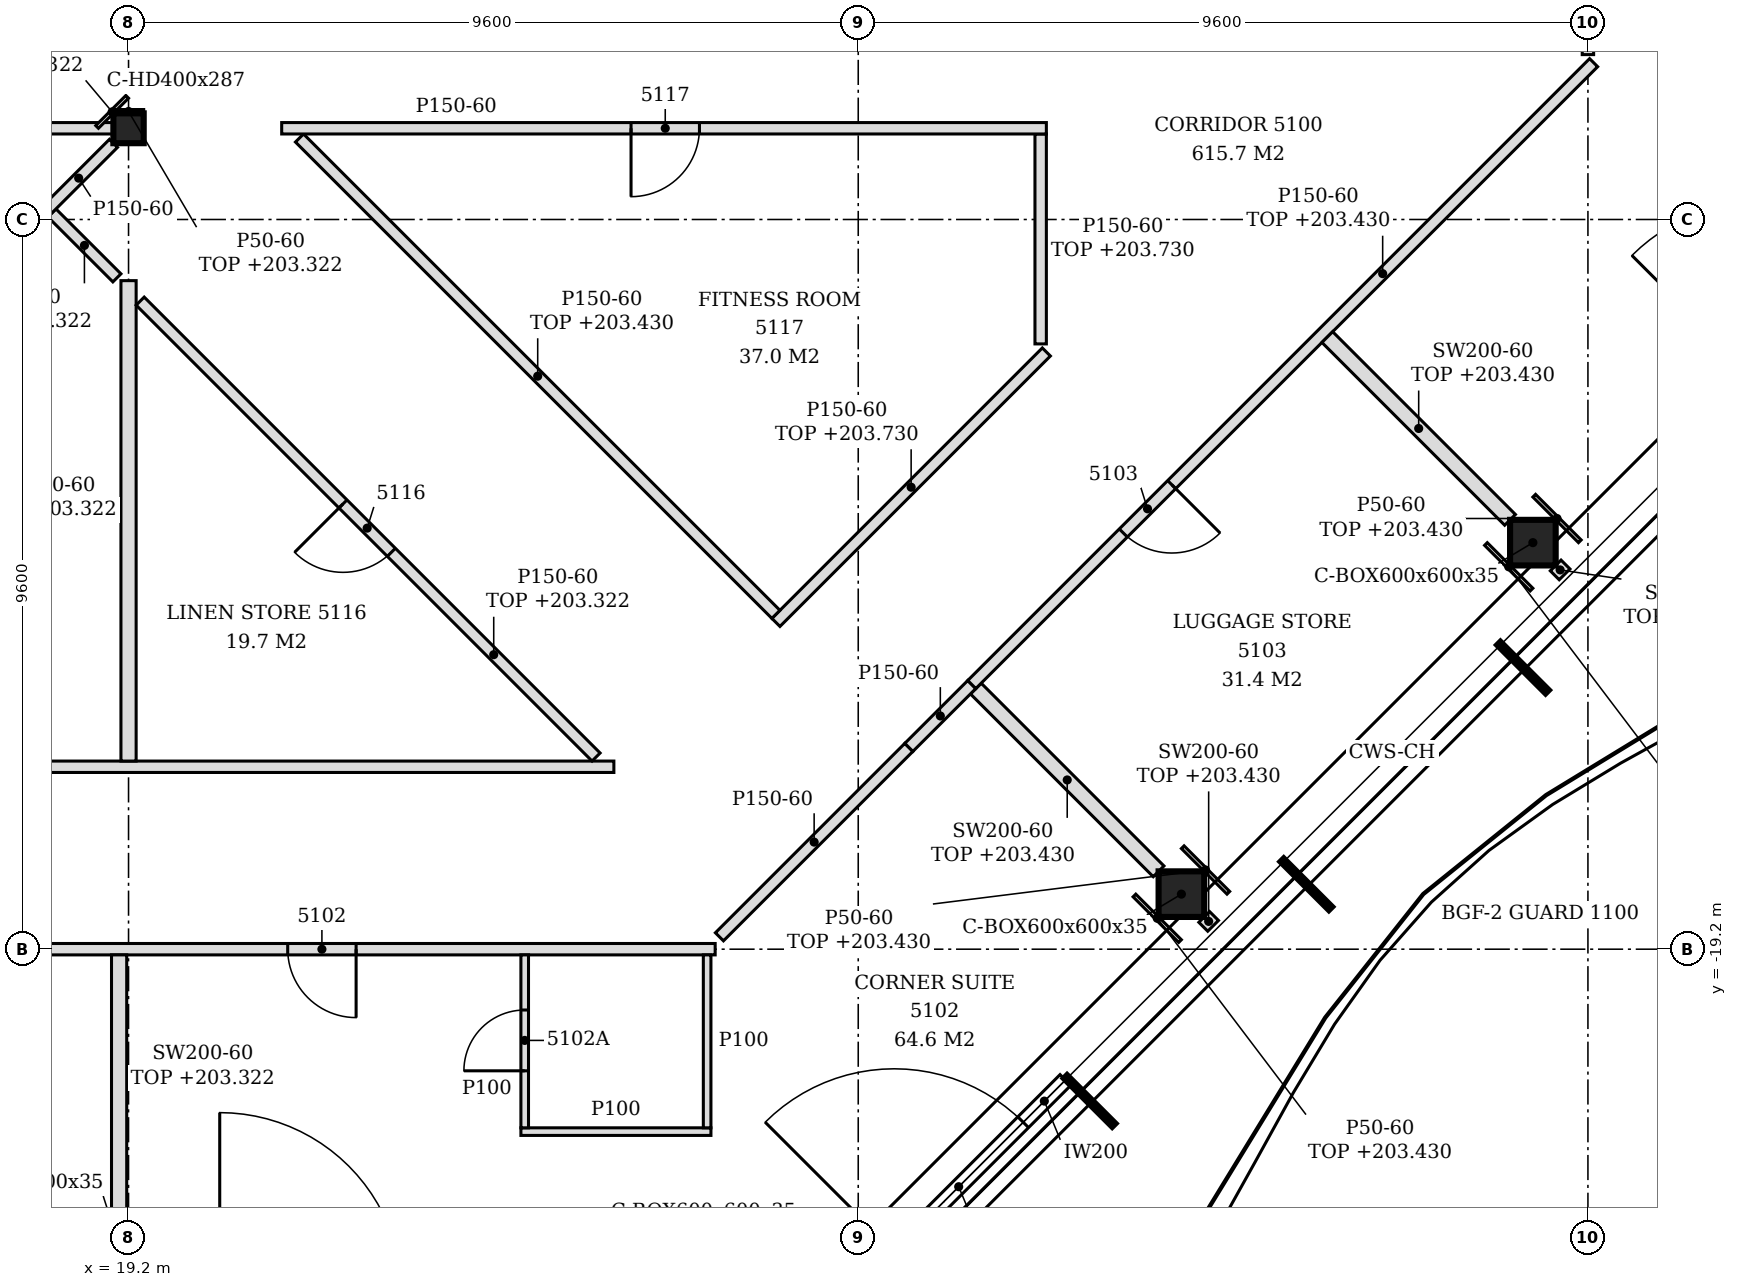
"""IFC4 building model, lengths in metres.
Left out: names, types, materials, properties, quantities, classifications, styles, units other than length and angle.
Written with IfcOpenShell. Run it as: python <this file> out.ifc"""

import sys

from ifc_helpers import new_model, si_unit, direction, frame, frame_2d, origin, origin_2d, place, context, subcontext, project, spatial, polyline, rectangle, hollow_rectangle, i_section, outline, extrude, clip, halfspace, element, fill, save


model = new_model("IFC4")
c1 = context("Model", 3, precision=1e-05, world=origin(), true_north=direction((0.0, 1.0)))
c2 = subcontext(c1, "Body", "Model", "MODEL_VIEW")
j1 = project(units=[si_unit("LENGTHUNIT", "METRE"), si_unit("PLANEANGLEUNIT", "RADIAN")], contexts=[c1])
p1 = place(None, origin())
s1 = spatial("IfcSite", under=j1, at=p1, CompositionType="ELEMENT")
p2 = place(p1, origin())
s2 = spatial("IfcBuilding", under=s1, at=p2, CompositionType="ELEMENT")
p3 = place(p2, frame((0.0, 0.0, 201.0)))
s3 = spatial("IfcBuildingStorey", under=s2, at=p3, CompositionType="ELEMENT", Elevation=201.0)
for number, where, z_axis, x_axis in (
    (1, (33.052, -18.476, -0.15), (0.0, 0.0, 1.0), (1.0, 0.0, 0.0)),
    (2, (37.676, -13.852, -0.15), (0.0, 0.0, 1.0), (1.0, 0.0, 0.0)),
):
    element("IfcColumn", number, at=place(p3, frame(where, z_axis=z_axis, x_axis=x_axis)), inside=s3, PredefinedType="COLUMN", context=c2, shape_type="Clipping", body=[
        clip(clip(extrude(hollow_rectangle(XDim=0.6, YDim=0.6, WallThickness=0.035, at=origin_2d()), origin(), (0.0, 0.0, 1.0), 3.5), halfspace(frame((0.0, 0.0, 0.011), z_axis=(0.0, 0.0, 1.0), x_axis=(1.0, 0.0, 0.0)), True)), halfspace(frame((0.0, 0.0, 3.095), z_axis=(0.0, 0.0, 1.0), x_axis=(1.0, 0.0, 0.0)), False)),
    ])
p4 = place(p3, frame((19.2, -8.4, -0.15), z_axis=(0.0, 0.0, 1.0), x_axis=(1.0, 0.0, 0.0)))
e3 = element("IfcColumn", 3, at=p4, inside=s3, PredefinedType="COLUMN", context=c2, shape_type="SweptSolid", body=[
    extrude(i_section(OverallWidth=0.399, OverallDepth=0.393, WebThickness=0.023, FlangeThickness=0.037, FilletRadius=0.015, at=origin_2d()), origin(), (0.0, 0.0, 1.0), 3.5),
])
p5 = place(p3, frame((28.725, -23.722, 0.0), z_axis=(0.0, 0.0, 1.0), x_axis=(0.707106781187, 0.707106781187, 0.0)))
e4 = element("IfcWall", 4, at=p5, inside=s3, PredefinedType="NOTDEFINED", context=c2, shape_type="SweptSolid", body=[
    extrude(rectangle(XDim=3.962, YDim=0.2, at=frame_2d((1.981, 0.0))), origin(), (0.0, 0.0, 1.0), 3.35),
])
p6 = place(p5, frame((0.775, 0.0, 0.0)))
e5 = element("IfcOpeningElement", 5, at=p6, cuts=e4, PredefinedType="OPENING", context=c2, shape_type="SweptSolid", body=[
    extrude(rectangle(XDim=2.4, YDim=2.4, at=frame_2d((1.2, 1.2))), frame((0.0, 0.11, 0.0), z_axis=(0.0, -1.0, 0.0), x_axis=(1.0, 0.0, 0.0)), (0.0, 0.0, 1.0), 0.22),
])
p7 = place(p3, frame((19.076, -22.8, 0.0), z_axis=(0.0, 0.0, 1.0), x_axis=(0.0, 1.0, 0.0)))
e6 = element("IfcWall", 6, at=p7, inside=s3, PredefinedType="PARTITIONING", context=c2, shape_type="SweptSolid", body=[
    extrude(rectangle(XDim=3.525, YDim=0.2, at=frame_2d((1.763, 0.0))), origin(), (0.0, 0.0, 1.0), 2.322),
])
p8 = place(p3, frame((24.362, -21.6, 0.0), z_axis=(0.0, 0.0, 1.0), x_axis=(1.0, 0.0, 0.0)))
e7 = element("IfcWall", 7, at=p8, inside=s3, PredefinedType="PARTITIONING", context=c2, shape_type="SweptSolid", body=[
    extrude(rectangle(XDim=2.5, YDim=0.1, at=frame_2d((1.25, 0.0))), origin(), (0.0, 0.0, 1.0), 3.35),
])
p9 = place(p3, frame((24.412, -21.55, 0.0), z_axis=(0.0, 0.0, 1.0), x_axis=(0.0, 1.0, 0.0)))
e8 = element("IfcWall", 8, at=p9, inside=s3, PredefinedType="PARTITIONING", context=c2, shape_type="SweptSolid", body=[
    extrude(outline(polyline([(0.0, 0.0), (2.275, 0.0), (2.275, 2.78), (2.245, 2.78), (2.243, 3.35), (0.0, 3.35), (0.0, 0.0)])), frame((0.0, 0.05, 0.0), z_axis=(0.0, -1.0, 0.0), x_axis=(1.0, 0.0, 0.0)), (0.0, 0.0, 1.0), 0.1),
])
p10 = place(p9, frame((0.75, 0.0, 0.0)))
e9 = element("IfcOpeningElement", 9, at=p10, cuts=e8, PredefinedType="OPENING", context=c2, shape_type="SweptSolid", body=[
    extrude(rectangle(XDim=0.8, YDim=2.1, at=frame_2d((0.4, 1.05))), frame((0.0, 0.06, 0.0), z_axis=(0.0, -1.0, 0.0), x_axis=(1.0, 0.0, 0.0)), (0.0, 0.0, 1.0), 0.12),
])
p11 = place(p3, frame((26.812, -21.55, 0.0), z_axis=(0.0, 0.0, 1.0), x_axis=(0.0, 1.0, 0.0)))
e10 = element("IfcWall", 10, at=p11, inside=s3, PredefinedType="PARTITIONING", context=c2, shape_type="SweptSolid", body=[
    extrude(outline(polyline([(0.0, 0.0), (2.275, 0.0), (2.275, 2.78), (2.245, 2.78), (2.243, 3.35), (0.0, 3.35), (0.0, 0.0)])), frame((0.0, 0.05, 0.0), z_axis=(0.0, -1.0, 0.0), x_axis=(1.0, 0.0, 0.0)), (0.0, 0.0, 1.0), 0.1),
])
p12 = place(p3, frame((2.5, -19.2, 0.0), z_axis=(0.0, 0.0, 1.0), x_axis=(1.0, 0.0, 0.0)))
e11 = element("IfcWall", 11, at=p12, inside=s3, PredefinedType="PARTITIONING", context=c2, shape_type="SweptSolid", body=[
    extrude(outline(polyline([(0.0, 0.0), (24.418, 0.0), (24.418, 2.78), (16.851, 2.78), (16.849, 2.322), (16.549, 2.322), (16.547, 2.78), (4.85, 2.78), (4.848, 2.63), (4.55, 2.63), (4.548, 2.78), (0.0, 2.78), (0.0, 0.0)])), frame((0.0, 0.075, 0.0), z_axis=(0.0, -1.0, 0.0), x_axis=(1.0, 0.0, 0.0)), (0.0, 0.0, 1.0), 0.15),
])
p13 = place(p12, frame((11.45, 0.0, 0.0)))
e12 = element("IfcOpeningElement", 12, at=p13, cuts=e11, PredefinedType="OPENING", context=c2, shape_type="SweptSolid", body=[
    extrude(rectangle(XDim=0.9, YDim=2.1, at=frame_2d((0.45, 1.05))), frame((0.0, 0.085, 0.0), z_axis=(0.0, -1.0, 0.0), x_axis=(1.0, 0.0, 0.0)), (0.0, 0.0, 1.0), 0.17),
])
p14 = place(p12, frame((18.794, 0.0, 0.0)))
e13 = element("IfcOpeningElement", 13, at=p14, cuts=e11, PredefinedType="OPENING", context=c2, shape_type="SweptSolid", body=[
    extrude(rectangle(XDim=0.9, YDim=2.1, at=frame_2d((0.45, 1.05))), frame((0.0, 0.085, 0.0), z_axis=(0.0, -1.0, 0.0), x_axis=(1.0, 0.0, 0.0)), (0.0, 0.0, 1.0), 0.17),
])
p15 = place(p3, frame((26.974, -19.037, 0.0), z_axis=(0.0, 0.0, 1.0), x_axis=(0.707106781187, 0.707106781187, 0.0)))
e14 = element("IfcWall", 14, at=p15, inside=s3, PredefinedType="PARTITIONING", context=c2, shape_type="SweptSolid", body=[
    extrude(rectangle(XDim=3.524, YDim=0.15, at=frame_2d((1.762, 0.0))), origin(), (0.0, 0.0, 1.0), 3.35),
])
p16 = place(p3, frame((33.469, -18.893, 0.0), z_axis=(0.0, 0.0, 1.0), x_axis=(-0.707106781187, 0.707106781187, 0.0)))
e15 = element("IfcWall", 15, at=p16, inside=s3, PredefinedType="PARTITIONING", context=c2, shape_type="SweptSolid", body=[
    extrude(rectangle(XDim=0.166, YDim=0.2, at=frame_2d((0.083, 0.0))), origin(), (0.0, 0.0, 1.0), 2.43),
])
p17 = place(p3, frame((32.752, -18.176, 0.0), z_axis=(0.0, 0.0, 1.0), x_axis=(-0.707106781187, 0.707106781187, 0.0)))
e16 = element("IfcWall", 16, at=p17, inside=s3, PredefinedType="PARTITIONING", context=c2, shape_type="SweptSolid", body=[
    extrude(rectangle(XDim=3.401, YDim=0.2, at=frame_2d((1.7, 0.0))), origin(), (0.0, 0.0, 1.0), 2.43),
])
p18 = place(p3, frame((7.125, -16.8, 0.0), z_axis=(0.0, 0.0, 1.0), x_axis=(1.0, 0.0, 0.0)))
e17 = element("IfcWall", 17, at=p18, inside=s3, PredefinedType="PARTITIONING", context=c2, shape_type="SweptSolid", body=[
    extrude(outline(polyline([(0.0, 0.0), (18.46, 0.0), (18.46, 3.35), (12.226, 3.35), (12.224, 2.322), (11.924, 2.322), (11.922, 3.35), (0.225, 3.35), (0.223, 2.63), (0.0, 2.63), (0.0, 0.0)])), frame((0.0, 0.075, 0.0), z_axis=(0.0, -1.0, 0.0), x_axis=(1.0, 0.0, 0.0)), (0.0, 0.0, 1.0), 0.15),
])
p19 = place(p3, frame((19.2, -16.725, 0.0), z_axis=(0.0, 0.0, 1.0), x_axis=(0.0, 1.0, 0.0)))
e18 = element("IfcWall", 18, at=p19, inside=s3, PredefinedType="PARTITIONING", context=c2, shape_type="SweptSolid", body=[
    extrude(rectangle(XDim=6.321, YDim=0.2, at=frame_2d((3.16, 0.0))), origin(), (0.0, 0.0, 1.0), 2.322),
])
p20 = place(p3, frame((25.351, -16.672, 0.0), z_axis=(0.0, 0.0, 1.0), x_axis=(-0.707106781187, 0.707106781187, 0.0)))
e19 = element("IfcWall", 19, at=p20, inside=s3, PredefinedType="PARTITIONING", context=c2, shape_type="SweptSolid", body=[
    extrude(rectangle(XDim=8.482, YDim=0.15, at=frame_2d((4.241, 0.0))), origin(), (0.0, 0.0, 1.0), 2.322),
])
p21 = place(p20, frame((3.809, 0.0, 0.0)))
e20 = element("IfcOpeningElement", 20, at=p21, cuts=e19, PredefinedType="OPENING", context=c2, shape_type="SweptSolid", body=[
    extrude(rectangle(XDim=0.9, YDim=2.1, at=frame_2d((0.45, 1.05))), frame((0.0, 0.085, 0.0), z_axis=(0.0, -1.0, 0.0), x_axis=(1.0, 0.0, 0.0)), (0.0, 0.0, 1.0), 0.17),
])
p22 = place(p3, frame((29.466, -16.545, 0.0), z_axis=(0.0, 0.0, 1.0), x_axis=(0.70752395322, 0.706689362889, 0.0)))
e21 = element("IfcWall", 21, at=p22, inside=s3, PredefinedType="PARTITIONING", context=c2, shape_type="SweptSolid", body=[
    extrude(rectangle(XDim=1.17, YDim=0.15, at=frame_2d((0.585, 0.0))), origin(), (0.0, 0.0, 1.0), 3.35),
])
p23 = place(p3, frame((30.294, -15.718, 0.0), z_axis=(0.0, 0.0, 1.0), x_axis=(0.707117331948, 0.707096230267, 0.0)))
e22 = element("IfcWall", 22, at=p23, inside=s3, PredefinedType="PARTITIONING", context=c2, shape_type="SweptSolid", body=[
    extrude(rectangle(XDim=11.57, YDim=0.15, at=frame_2d((5.785, 0.0))), origin(), (0.0, 0.0, 1.0), 2.43),
])
p24 = place(p23, frame((2.819, 0.0, 0.0)))
e23 = element("IfcOpeningElement", 23, at=p24, cuts=e22, PredefinedType="OPENING", context=c2, shape_type="SweptSolid", body=[
    extrude(rectangle(XDim=0.9, YDim=2.1, at=frame_2d((0.45, 1.05))), frame((0.0, 0.085, 0.0), z_axis=(0.0, -1.0, 0.0), x_axis=(1.0, 0.0, 0.0)), (0.0, 0.0, 1.0), 0.17),
])
p25 = place(p3, frame((27.717, -14.901, 0.0), z_axis=(0.0, 0.0, 1.0), x_axis=(0.707106781187, 0.707106781187, 0.0)))
e24 = element("IfcWall", 24, at=p25, inside=s3, PredefinedType="PARTITIONING", context=c2, shape_type="SweptSolid", body=[
    extrude(rectangle(XDim=5.031, YDim=0.15, at=frame_2d((2.516, 0.0))), origin(), (0.0, 0.0, 1.0), 2.73),
])
p26 = place(p3, frame((27.717, -14.795, 0.0), z_axis=(0.0, 0.0, 1.0), x_axis=(-0.707175638903, 0.707037916764, 0.0)))
e25 = element("IfcWall", 25, at=p26, inside=s3, PredefinedType="PARTITIONING", context=c2, shape_type="SweptSolid", body=[
    extrude(rectangle(XDim=8.864, YDim=0.15, at=frame_2d((4.432, 0.0))), origin(), (0.0, 0.0, 1.0), 2.43),
])
p27 = place(p3, frame((38.093, -14.269, 0.0), z_axis=(0.0, 0.0, 1.0), x_axis=(-0.707106781187, 0.707106781187, 0.0)))
e26 = element("IfcWall", 26, at=p27, inside=s3, PredefinedType="PARTITIONING", context=c2, shape_type="SweptSolid", body=[
    extrude(rectangle(XDim=0.166, YDim=0.2, at=frame_2d((0.083, 0.0))), origin(), (0.0, 0.0, 1.0), 2.43),
])
p28 = place(p3, frame((37.375, -13.552, 0.0), z_axis=(0.0, 0.0, 1.0), x_axis=(-0.707106781187, 0.707106781187, 0.0)))
e27 = element("IfcWall", 27, at=p28, inside=s3, PredefinedType="PARTITIONING", context=c2, shape_type="SweptSolid", body=[
    extrude(rectangle(XDim=3.4, YDim=0.2, at=frame_2d((1.7, 0.0))), origin(), (0.0, 0.0, 1.0), 2.43),
])
p29 = place(p3, frame((31.2, -11.237, 0.0), z_axis=(0.0, 0.0, 1.0), x_axis=(0.0, 1.0, 0.0)))
e28 = element("IfcWall", 28, at=p29, inside=s3, PredefinedType="PARTITIONING", context=c2, shape_type="SweptSolid", body=[
    extrude(outline(polyline([(0.0, 0.0), (2.762, 0.0), (2.762, 2.73), (2.09, 2.73), (2.088, 2.43), (1.187, 2.43), (1.185, 2.73), (0.0, 2.73), (0.0, 0.0)])), frame((0.0, 0.075, 0.0), z_axis=(0.0, -1.0, 0.0), x_axis=(1.0, 0.0, 0.0)), (0.0, 0.0, 1.0), 0.15),
])
p30 = place(p3, frame((19.047, -10.368, 0.0), z_axis=(0.0, 0.0, 1.0), x_axis=(-0.707409718716, 0.706803713817, 0.0)))
e29 = element("IfcWall", 29, at=p30, inside=s3, PredefinedType="PARTITIONING", context=c2, shape_type="SweptSolid", body=[
    extrude(rectangle(XDim=1.208, YDim=0.15, at=frame_2d((0.604, 0.0))), origin(), (0.0, 0.0, 1.0), 2.322),
])
p31 = place(p3, frame((18.086, -9.514, 0.0), z_axis=(0.0, 0.0, 1.0), x_axis=(0.707106781187, 0.707106781187, 0.0)))
e30 = element("IfcWall", 30, at=p31, inside=s3, PredefinedType="PARTITIONING", context=c2, shape_type="SweptSolid", body=[
    extrude(rectangle(XDim=1.295, YDim=0.15, at=frame_2d((0.648, 0.0))), origin(), (0.0, 0.0, 1.0), 3.35),
])
p32 = place(p3, frame((7.399, -8.4, 0.0), z_axis=(0.0, 0.0, 1.0), x_axis=(1.0, 0.0, 0.0)))
e31 = element("IfcWall", 31, at=p32, inside=s3, PredefinedType="PARTITIONING", context=c2, shape_type="SweptSolid", body=[
    extrude(rectangle(XDim=11.601, YDim=0.15, at=frame_2d((5.801, 0.0))), origin(), (0.0, 0.0, 1.0), 2.73),
])
p33 = place(p32, frame((5.351, 0.0, 0.0)))
e32 = element("IfcOpeningElement", 32, at=p33, cuts=e31, PredefinedType="OPENING", context=c2, shape_type="SweptSolid", body=[
    extrude(rectangle(XDim=0.9, YDim=2.1, at=frame_2d((0.45, 1.05))), frame((0.0, 0.085, 0.0), z_axis=(0.0, -1.0, 0.0), x_axis=(1.0, 0.0, 0.0)), (0.0, 0.0, 1.0), 0.17),
])
p34 = place(p3, frame((21.215, -8.4, 0.0), z_axis=(0.0, 0.0, 1.0), x_axis=(1.0, 0.0, 0.0)))
e33 = element("IfcWall", 33, at=p34, inside=s3, PredefinedType="PARTITIONING", context=c2, shape_type="SweptSolid", body=[
    extrude(outline(polyline([(0.0, 0.0), (10.06, 0.0), (10.06, 2.83), (9.835, 2.83), (9.833, 3.35), (0.0, 3.35), (0.0, 0.0)])), frame((0.0, 0.075, 0.0), z_axis=(0.0, -1.0, 0.0), x_axis=(1.0, 0.0, 0.0)), (0.0, 0.0, 1.0), 0.15),
])
p35 = place(p34, frame((4.596, 0.0, 0.0)))
e34 = element("IfcOpeningElement", 34, at=p35, cuts=e33, PredefinedType="OPENING", context=c2, shape_type="SweptSolid", body=[
    extrude(rectangle(XDim=0.9, YDim=2.1, at=frame_2d((0.45, 1.05))), frame((0.0, 0.085, 0.0), z_axis=(0.0, -1.0, 0.0), x_axis=(1.0, 0.0, 0.0)), (0.0, 0.0, 1.0), 0.17),
])
p36 = place(p3, frame((38.4, -7.431, 0.0), z_axis=(0.0, 0.0, 1.0), x_axis=(0.0, 1.0, 0.0)))
e35 = element("IfcWall", 35, at=p36, inside=s3, PredefinedType="PARTITIONING", context=c2, shape_type="SweptSolid", body=[
    extrude(outline(polyline([(0.0, 0.0), (15.149, 0.0), (15.149, 3.35), (12.336, 3.35), (12.334, 2.78), (12.126, 2.78), (12.124, 3.35), (7.536, 3.35), (7.534, 2.78), (7.326, 2.78), (7.324, 3.35), (2.736, 3.35), (2.734, 2.78), (2.526, 2.78), (2.524, 3.35), (0.0, 3.35), (0.0, 0.0)])), frame((0.0, 0.075, 0.0), z_axis=(0.0, -1.0, 0.0), x_axis=(1.0, 0.0, 0.0)), (0.0, 0.0, 1.0), 0.15),
])
p37 = place(p36, frame((1.975, 0.0, 0.0)))
e36 = element("IfcOpeningElement", 36, at=p37, cuts=e35, PredefinedType="OPENING", context=c2, shape_type="SweptSolid", body=[
    extrude(rectangle(XDim=0.9, YDim=2.1, at=frame_2d((0.45, 1.05))), frame((0.0, 0.085, 0.0), z_axis=(0.0, -1.0, 0.0), x_axis=(1.0, 0.0, 0.0)), (0.0, 0.0, 1.0), 0.17),
])
p38 = place(p36, frame((9.587, 0.0, 0.0)))
e37 = element("IfcOpeningElement", 37, at=p38, cuts=e35, PredefinedType="OPENING", context=c2, shape_type="SweptSolid", body=[
    extrude(rectangle(XDim=0.9, YDim=2.1, at=frame_2d((0.45, 1.05))), frame((0.0, 0.085, 0.0), z_axis=(0.0, -1.0, 0.0), x_axis=(1.0, 0.0, 0.0)), (0.0, 0.0, 1.0), 0.17),
])
p39 = place(p3, frame((33.034, -19.094, 0.0), z_axis=(0.0, 0.0, 1.0), x_axis=(-0.706962899457, 0.707250633645, 0.0)))
e38 = element("IfcWall", 38, at=p39, inside=s3, PredefinedType="PARTITIONING", context=c2, shape_type="SweptSolid", body=[
    extrude(rectangle(XDim=0.848, YDim=0.05, at=frame_2d((0.424, 0.0))), origin(), (0.0, 0.0, 1.0), 2.43),
])
p40 = place(p3, frame((33.669, -18.458, 0.0), z_axis=(0.0, 0.0, 1.0), x_axis=(-0.707106781187, 0.707106781187, 0.0)))
e39 = element("IfcWall", 39, at=p40, inside=s3, PredefinedType="PARTITIONING", context=c2, shape_type="SweptSolid", body=[
    extrude(rectangle(XDim=0.849, YDim=0.05, at=frame_2d((0.424, 0.0))), origin(), (0.0, 0.0, 1.0), 2.43),
])
for number, where, z_axis, x_axis in (
    (40, (37.658, -14.469, 0.0), (0.0, 0.0, 1.0), (-0.707, 0.707, 0.0)),
    (41, (38.293, -13.834, 0.0), (0.0, 0.0, 1.0), (-0.707, 0.707, 0.0)),
):
    element("IfcWall", number, at=place(p3, frame(where, z_axis=z_axis, x_axis=x_axis)), inside=s3, PredefinedType="PARTITIONING", context=c2, shape_type="SweptSolid", body=[
        extrude(rectangle(XDim=0.848, YDim=0.05, at=frame_2d((0.424, 0.0))), origin(), (0.0, 0.0, 1.0), 2.43),
    ])
p41 = place(p3, frame((18.786, -8.382, 0.0), z_axis=(0.0, 0.0, 1.0), x_axis=(0.707106781187, 0.707106781187, 0.0)))
e42 = element("IfcWall", 42, at=p41, inside=s3, PredefinedType="PARTITIONING", context=c2, shape_type="SweptSolid", body=[
    extrude(rectangle(XDim=0.56, YDim=0.05, at=frame_2d((0.28, 0.0))), origin(), (0.0, 0.0, 1.0), 2.322),
])
p42 = place(p3, frame((19.0, -8.178, 0.0), z_axis=(0.0, 0.0, 1.0), x_axis=(1.0, 0.0, 0.0)))
e43 = element("IfcWall", 43, at=p42, inside=s3, PredefinedType="PARTITIONING", context=c2, shape_type="SweptSolid", body=[
    extrude(rectangle(XDim=0.399, YDim=0.05, at=frame_2d((0.199, 0.0))), origin(), (0.0, 0.0, 1.0), 2.322),
])
p43 = place(p6, origin())
e44 = element("IfcDoor", 44, at=p43, inside=s3, OperationType="SINGLE_SWING_LEFT", PredefinedType="DOOR", context=c2, shape_type="SweptSolid", body=[
    extrude(rectangle(XDim=2.4, YDim=2.4, at=frame_2d((1.2, 1.2))), frame((0.0, 0.025, 0.0), z_axis=(0.0, -1.0, 0.0), x_axis=(1.0, 0.0, 0.0)), (0.0, 0.0, 1.0), 0.05),
])
fill(e5, e44)
p44 = place(p14, frame((0.9, 0.0, 0.0), z_axis=(0.0, 0.0, 1.0), x_axis=(-1.0, 0.0, 0.0)))
e45 = element("IfcDoor", 45, at=p44, inside=s3, OperationType="SINGLE_SWING_LEFT", PredefinedType="DOOR", context=c2, shape_type="SweptSolid", body=[
    extrude(rectangle(XDim=0.9, YDim=2.1, at=frame_2d((0.45, 1.05))), frame((0.0, 0.025, 0.0), z_axis=(0.0, -1.0, 0.0), x_axis=(1.0, 0.0, 0.0)), (0.0, 0.0, 1.0), 0.05),
])
fill(e13, e45)
p45 = place(p10, origin())
e46 = element("IfcDoor", 46, at=p45, inside=s3, OperationType="SINGLE_SWING_LEFT", PredefinedType="DOOR", context=c2, shape_type="SweptSolid", body=[
    extrude(rectangle(XDim=0.8, YDim=2.1, at=frame_2d((0.4, 1.05))), frame((0.0, 0.025, 0.0), z_axis=(0.0, -1.0, 0.0), x_axis=(1.0, 0.0, 0.0)), (0.0, 0.0, 1.0), 0.05),
])
fill(e9, e46)
p46 = place(p24, frame((0.9, 0.0, 0.0), z_axis=(0.0, 0.0, 1.0), x_axis=(-1.0, 0.0, 0.0)))
e47 = element("IfcDoor", 47, at=p46, inside=s3, OperationType="SINGLE_SWING_LEFT", PredefinedType="DOOR", context=c2, shape_type="SweptSolid", body=[
    extrude(rectangle(XDim=0.9, YDim=2.1, at=frame_2d((0.45, 1.05))), frame((0.0, 0.025, 0.0), z_axis=(0.0, -1.0, 0.0), x_axis=(1.0, 0.0, 0.0)), (0.0, 0.0, 1.0), 0.05),
])
fill(e23, e47)
p47 = place(p21, origin())
e48 = element("IfcDoor", 48, at=p47, inside=s3, OperationType="SINGLE_SWING_RIGHT", PredefinedType="DOOR", context=c2, shape_type="SweptSolid", body=[
    extrude(rectangle(XDim=0.9, YDim=2.1, at=frame_2d((0.45, 1.05))), frame((0.0, 0.025, 0.0), z_axis=(0.0, -1.0, 0.0), x_axis=(1.0, 0.0, 0.0)), (0.0, 0.0, 1.0), 0.05),
])
fill(e20, e48)
p48 = place(p35, frame((0.9, 0.0, 0.0), z_axis=(0.0, 0.0, 1.0), x_axis=(-1.0, 0.0, 0.0)))
e49 = element("IfcDoor", 49, at=p48, inside=s3, OperationType="SINGLE_SWING_RIGHT", PredefinedType="DOOR", context=c2, shape_type="SweptSolid", body=[
    extrude(rectangle(XDim=0.9, YDim=2.1, at=frame_2d((0.45, 1.05))), frame((0.0, 0.025, 0.0), z_axis=(0.0, -1.0, 0.0), x_axis=(1.0, 0.0, 0.0)), (0.0, 0.0, 1.0), 0.05),
])
fill(e34, e49)
save(model, sys.argv[1])
